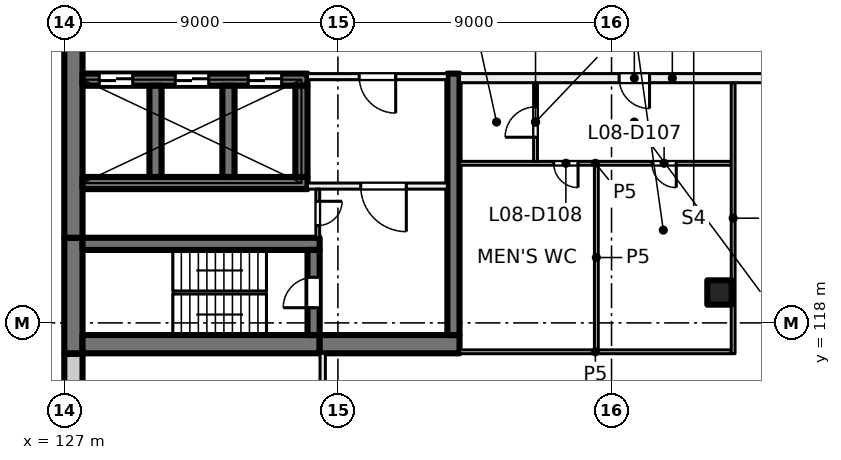
"""IFC4 building model, lengths in metres.
Left out: names, types, materials, properties, quantities, classifications, styles, units other than length and angle.
Written with IfcOpenShell. Run it as: python <this file> out.ifc"""

import sys

from ifc_helpers import new_model, si_unit, direction, frame, frame_2d, origin, origin_2d, place, context, subcontext, project, spatial, rectangle, extrude, element, fill, save


model = new_model("IFC4")
c1 = context("Model", 3, precision=1e-05, world=origin(), true_north=direction((0.0, 1.0)))
c2 = subcontext(c1, "Body", "Model", "MODEL_VIEW")
j1 = project(units=[si_unit("LENGTHUNIT", "METRE"), si_unit("PLANEANGLEUNIT", "RADIAN")], contexts=[c1])
p1 = place(None, origin())
s1 = spatial("IfcSite", under=j1, at=p1, CompositionType="ELEMENT")
p2 = place(p1, origin())
s2 = spatial("IfcBuilding", under=s1, at=p2, CompositionType="ELEMENT")
p3 = place(p2, frame((0.0, 0.0, 39.5)))
s3 = spatial("IfcBuildingStorey", under=s2, at=p3, CompositionType="ELEMENT", Elevation=39.5)
p4 = place(p3, frame((148.55, 119.0, 0.0), z_axis=(0.0, 0.0, 1.0), x_axis=(1.0, 0.0, 0.0)))
e1 = element("IfcColumn", 1, at=p4, inside=s3, PredefinedType="COLUMN", context=c2, shape_type="SweptSolid", body=[
    extrude(rectangle(XDim=0.8, YDim=0.8, at=origin_2d()), origin(), (0.0, 0.0, 1.0), 4.0),
])
p5 = place(p3, frame((127.3, 117.0, 0.0), z_axis=(0.0, 0.0, 1.0), x_axis=(0.0, 1.0, 0.0)))
e2 = element("IfcWall", 2, at=p5, inside=s3, PredefinedType="SHEAR", context=c2, shape_type="SweptSolid", body=[
    extrude(rectangle(XDim=3.8, YDim=0.6, at=frame_2d((1.9, 0.0))), origin(), (0.0, 0.0, 1.0), 4.0),
])
p6 = place(p3, frame((127.3, 120.8, 0.0), z_axis=(0.0, 0.0, 1.0), x_axis=(0.0, 1.0, 0.0)))
e3 = element("IfcWall", 3, at=p6, inside=s3, PredefinedType="SHEAR", context=c2, shape_type="SweptSolid", body=[
    extrude(rectangle(XDim=14.4, YDim=0.6, at=frame_2d((7.2, 0.0))), origin(), (0.0, 0.0, 1.0), 4.0),
])
p7 = place(p3, frame((127.6, 117.3, 0.0), z_axis=(0.0, 0.0, 1.0), x_axis=(1.0, 0.0, 0.0)))
e4 = element("IfcWall", 4, at=p7, inside=s3, PredefinedType="SHEAR", context=c2, shape_type="SweptSolid", body=[
    extrude(rectangle(XDim=7.8, YDim=0.6, at=frame_2d((3.9, 0.0))), origin(), (0.0, 0.0, 1.0), 4.0),
])
p8 = place(p3, frame((135.4, 117.3, 0.0), z_axis=(0.0, 0.0, 1.0), x_axis=(1.0, 0.0, 0.0)))
e5 = element("IfcWall", 5, at=p8, inside=s3, PredefinedType="SHEAR", context=c2, shape_type="SweptSolid", body=[
    extrude(rectangle(XDim=4.6, YDim=0.6, at=frame_2d((2.3, 0.0))), origin(), (0.0, 0.0, 1.0), 4.0),
])
p9 = place(p3, frame((127.6, 120.6, 0.0), z_axis=(0.0, 0.0, 1.0), x_axis=(1.0, 0.0, 0.0)))
e6 = element("IfcWall", 6, at=p9, inside=s3, PredefinedType="SHEAR", context=c2, shape_type="SweptSolid", body=[
    extrude(rectangle(XDim=7.8, YDim=0.4, at=frame_2d((3.9, 0.0))), origin(), (0.0, 0.0, 1.0), 4.0),
])
p10 = place(p3, frame((135.2, 117.6, 0.0), z_axis=(0.0, 0.0, 1.0), x_axis=(0.0, 1.0, 0.0)))
e7 = element("IfcWall", 7, at=p10, inside=s3, PredefinedType="SHEAR", context=c2, shape_type="SweptSolid", body=[
    extrude(rectangle(XDim=2.8, YDim=0.4, at=frame_2d((1.4, 0.0))), origin(), (0.0, 0.0, 1.0), 4.0),
])
p11 = place(p10, frame((0.9, 0.0, 0.0)))
e8 = element("IfcOpeningElement", 8, at=p11, cuts=e7, PredefinedType="OPENING", context=c2, shape_type="SweptSolid", body=[
    extrude(rectangle(XDim=1.0, YDim=2.1, at=frame_2d((0.5, 1.05))), frame((0.0, 0.21, 0.0), z_axis=(0.0, -1.0, 0.0), x_axis=(1.0, 0.0, 0.0)), (0.0, 0.0, 1.0), 0.42),
])
p12 = place(p3, frame((127.6, 126.0, 0.0), z_axis=(0.0, 0.0, 1.0), x_axis=(1.0, 0.0, 0.0)))
e9 = element("IfcWall", 9, at=p12, inside=s3, PredefinedType="SHEAR", context=c2, shape_type="SweptSolid", body=[
    extrude(rectangle(XDim=7.4, YDim=0.4, at=frame_2d((3.7, 0.0))), origin(), (0.0, 0.0, 1.0), 4.0),
])
p13 = place(p12, frame((0.55, 0.0, 0.0)))
e10 = element("IfcOpeningElement", 10, at=p13, cuts=e9, PredefinedType="OPENING", context=c2, shape_type="SweptSolid", body=[
    extrude(rectangle(XDim=1.1, YDim=2.1, at=frame_2d((0.55, 1.05))), frame((0.0, 0.21, 0.0), z_axis=(0.0, -1.0, 0.0), x_axis=(1.0, 0.0, 0.0)), (0.0, 0.0, 1.0), 0.42),
])
p14 = place(p12, frame((3.05, 0.0, 0.0)))
e11 = element("IfcOpeningElement", 11, at=p14, cuts=e9, PredefinedType="OPENING", context=c2, shape_type="SweptSolid", body=[
    extrude(rectangle(XDim=1.1, YDim=2.1, at=frame_2d((0.55, 1.05))), frame((0.0, 0.21, 0.0), z_axis=(0.0, -1.0, 0.0), x_axis=(1.0, 0.0, 0.0)), (0.0, 0.0, 1.0), 0.42),
])
p15 = place(p12, frame((5.45, 0.0, 0.0)))
e12 = element("IfcOpeningElement", 12, at=p15, cuts=e9, PredefinedType="OPENING", context=c2, shape_type="SweptSolid", body=[
    extrude(rectangle(XDim=1.1, YDim=2.1, at=frame_2d((0.55, 1.05))), frame((0.0, 0.21, 0.0), z_axis=(0.0, -1.0, 0.0), x_axis=(1.0, 0.0, 0.0)), (0.0, 0.0, 1.0), 0.42),
])
p16 = place(p3, frame((127.6, 122.6, 0.0), z_axis=(0.0, 0.0, 1.0), x_axis=(1.0, 0.0, 0.0)))
e13 = element("IfcWall", 13, at=p16, inside=s3, PredefinedType="SHEAR", context=c2, shape_type="SweptSolid", body=[
    extrude(rectangle(XDim=7.4, YDim=0.4, at=frame_2d((3.7, 0.0))), origin(), (0.0, 0.0, 1.0), 4.0),
])
for number, where, z_axis, x_axis in (
    (14, (130.0, 122.8, 0.0), (0.0, 0.0, 1.0), (0.0, 1.0, 0.0)),
    (15, (132.4, 122.8, 0.0), (0.0, 0.0, 1.0), (0.0, 1.0, 0.0)),
    (16, (134.8, 122.8, 0.0), (0.0, 0.0, 1.0), (0.0, 1.0, 0.0)),
):
    element("IfcWall", number, at=place(p3, frame(where, z_axis=z_axis, x_axis=x_axis)), inside=s3, PredefinedType="SHEAR", context=c2, shape_type="SweptSolid", body=[
        extrude(rectangle(XDim=3.0, YDim=0.4, at=frame_2d((1.5, 0.0))), origin(), (0.0, 0.0, 1.0), 4.0),
    ])
p17 = place(p3, frame((139.8, 117.6, 0.0), z_axis=(0.0, 0.0, 1.0), x_axis=(0.0, 1.0, 0.0)))
e17 = element("IfcWall", 17, at=p17, inside=s3, PredefinedType="SHEAR", context=c2, shape_type="SweptSolid", body=[
    extrude(rectangle(XDim=8.6, YDim=0.4, at=frame_2d((4.3, 0.0))), origin(), (0.0, 0.0, 1.0), 4.0),
])
p18 = place(p3, frame((127.3, 114.07, 0.0), z_axis=(0.0, 0.0, 1.0), x_axis=(0.0, 1.0, 0.0)))
e18 = element("IfcWall", 18, at=p18, inside=s3, PredefinedType="SOLIDWALL", context=c2, shape_type="SweptSolid", body=[
    extrude(rectangle(XDim=2.91, YDim=0.6, at=frame_2d((1.455, 0.0))), origin(), (0.0, 0.0, 1.0), 3.625),
])
p19 = place(p3, frame((139.6, 126.1, 0.0), z_axis=(0.0, 0.0, 1.0), x_axis=(-1.0, 0.0, 0.0)))
e19 = element("IfcWall", 19, at=p19, inside=s3, PredefinedType="PARTITIONING", context=c2, shape_type="SweptSolid", body=[
    extrude(rectangle(XDim=4.6, YDim=0.2, at=frame_2d((2.3, 0.0))), origin(), (0.0, 0.0, 1.0), 3.625),
])
p20 = place(p19, frame((1.7, 0.0, 0.0)))
e20 = element("IfcOpeningElement", 20, at=p20, cuts=e19, PredefinedType="OPENING", context=c2, shape_type="SweptSolid", body=[
    extrude(rectangle(XDim=1.2, YDim=2.1, at=frame_2d((0.6, 1.05))), frame((0.0, 0.11, 0.0), z_axis=(0.0, -1.0, 0.0), x_axis=(1.0, 0.0, 0.0)), (0.0, 0.0, 1.0), 0.22),
])
p21 = place(p3, frame((139.6, 122.5, 0.0), z_axis=(0.0, 0.0, 1.0), x_axis=(-1.0, 0.0, 0.0)))
e21 = element("IfcWall", 21, at=p21, inside=s3, PredefinedType="PARTITIONING", context=c2, shape_type="SweptSolid", body=[
    extrude(rectangle(XDim=4.6, YDim=0.2, at=frame_2d((2.3, 0.0))), origin(), (0.0, 0.0, 1.0), 3.625),
])
p22 = place(p21, frame((1.35, 0.0, 0.0)))
e22 = element("IfcOpeningElement", 22, at=p22, cuts=e21, PredefinedType="OPENING", context=c2, shape_type="SweptSolid", body=[
    extrude(rectangle(XDim=1.5, YDim=2.1, at=frame_2d((0.75, 1.05))), frame((0.0, 0.11, 0.0), z_axis=(0.0, -1.0, 0.0), x_axis=(1.0, 0.0, 0.0)), (0.0, 0.0, 1.0), 0.22),
])
p23 = place(p3, frame((135.337, 122.4, 0.0), z_axis=(0.0, 0.0, 1.0), x_axis=(0.0, -1.0, 0.0)))
e23 = element("IfcWall", 23, at=p23, inside=s3, PredefinedType="PARTITIONING", context=c2, shape_type="SweptSolid", body=[
    extrude(rectangle(XDim=1.6, YDim=0.125, at=frame_2d((0.8, 0.0))), origin(), (0.0, 0.0, 1.0), 3.625),
])
p24 = place(p23, frame((0.4, 0.0, 0.0)))
e24 = element("IfcOpeningElement", 24, at=p24, cuts=e23, PredefinedType="OPENING", context=c2, shape_type="SweptSolid", body=[
    extrude(rectangle(XDim=0.8, YDim=2.1, at=frame_2d((0.4, 1.05))), frame((0.0, 0.073, 0.0), z_axis=(0.0, -1.0, 0.0), x_axis=(1.0, 0.0, 0.0)), (0.0, 0.0, 1.0), 0.145),
])
p25 = place(p3, frame((135.5, 117.0, 0.0), z_axis=(0.0, 0.0, 1.0), x_axis=(0.0, -1.0, 0.0)))
e25 = element("IfcWall", 25, at=p25, inside=s3, PredefinedType="PARTITIONING", context=c2, shape_type="SweptSolid", body=[
    extrude(rectangle(XDim=6.4, YDim=0.175, at=frame_2d((3.2, 0.0))), origin(), (0.0, 0.0, 1.0), 3.625),
])
p26 = place(p25, frame((2.6, 0.0, 0.0)))
e26 = element("IfcOpeningElement", 26, at=p26, cuts=e25, PredefinedType="OPENING", context=c2, shape_type="SweptSolid", body=[
    extrude(rectangle(XDim=1.2, YDim=2.1, at=frame_2d((0.6, 1.05))), frame((0.0, 0.097, 0.0), z_axis=(0.0, -1.0, 0.0), x_axis=(1.0, 0.0, 0.0)), (0.0, 0.0, 1.0), 0.195),
])
p27 = place(p3, frame((140.0, 117.05, 0.0), z_axis=(0.0, 0.0, 1.0), x_axis=(1.0, 0.0, 0.0)))
e27 = element("IfcWall", 27, at=p27, inside=s3, PredefinedType="PARTITIONING", context=c2, shape_type="SweptSolid", body=[
    extrude(rectangle(XDim=8.938, YDim=0.125, at=frame_2d((4.469, 0.0))), origin(), (0.0, 0.0, 1.0), 3.625),
])
p28 = place(p3, frame((148.938, 123.25, 0.0), z_axis=(0.0, 0.0, 1.0), x_axis=(-1.0, 0.0, 0.0)))
e28 = element("IfcWall", 28, at=p28, inside=s3, PredefinedType="PARTITIONING", context=c2, shape_type="SweptSolid", body=[
    extrude(rectangle(XDim=8.938, YDim=0.125, at=frame_2d((4.469, 0.0))), origin(), (0.0, 0.0, 1.0), 3.625),
])
p29 = place(p28, frame((1.809, 0.0, 0.0)))
e29 = element("IfcOpeningElement", 29, at=p29, cuts=e28, PredefinedType="OPENING", context=c2, shape_type="SweptSolid", body=[
    extrude(rectangle(XDim=0.8, YDim=2.1, at=frame_2d((0.4, 1.05))), frame((0.0, 0.073, 0.0), z_axis=(0.0, -1.0, 0.0), x_axis=(1.0, 0.0, 0.0)), (0.0, 0.0, 1.0), 0.145),
])
p30 = place(p28, frame((5.04, 0.0, 0.0)))
e30 = element("IfcOpeningElement", 30, at=p30, cuts=e28, PredefinedType="OPENING", context=c2, shape_type="SweptSolid", body=[
    extrude(rectangle(XDim=0.8, YDim=2.1, at=frame_2d((0.4, 1.05))), frame((0.0, 0.073, 0.0), z_axis=(0.0, -1.0, 0.0), x_axis=(1.0, 0.0, 0.0)), (0.0, 0.0, 1.0), 0.145),
])
p31 = place(p3, frame((142.5, 123.312, 0.0), z_axis=(0.0, 0.0, 1.0), x_axis=(0.0, 1.0, 0.0)))
e31 = element("IfcWall", 31, at=p31, inside=s3, PredefinedType="PARTITIONING", context=c2, shape_type="SweptSolid", body=[
    extrude(rectangle(XDim=2.588, YDim=0.125, at=frame_2d((1.294, 0.0))), origin(), (0.0, 0.0, 1.0), 3.625),
])
p32 = place(p31, frame((0.794, 0.0, 0.0)))
e32 = element("IfcOpeningElement", 32, at=p32, cuts=e31, PredefinedType="OPENING", context=c2, shape_type="SweptSolid", body=[
    extrude(rectangle(XDim=1.0, YDim=2.1, at=frame_2d((0.5, 1.05))), frame((0.0, 0.073, 0.0), z_axis=(0.0, -1.0, 0.0), x_axis=(1.0, 0.0, 0.0)), (0.0, 0.0, 1.0), 0.145),
])
p33 = place(p3, frame((144.5, 123.188, 0.0), z_axis=(0.0, 0.0, 1.0), x_axis=(0.0, -1.0, 0.0)))
e33 = element("IfcWall", 33, at=p33, inside=s3, PredefinedType="PARTITIONING", context=c2, shape_type="SweptSolid", body=[
    extrude(rectangle(XDim=6.076, YDim=0.125, at=frame_2d((3.038, 0.0))), origin(), (0.0, 0.0, 1.0), 3.625),
])
p34 = place(p3, frame((149.0, 116.988, 0.0), z_axis=(0.0, 0.0, 1.0), x_axis=(0.0, 1.0, 0.0)))
e34 = element("IfcWall", 34, at=p34, inside=s3, PredefinedType="PARTITIONING", context=c2, shape_type="SweptSolid", body=[
    extrude(rectangle(XDim=8.912, YDim=0.125, at=frame_2d((4.456, 0.0))), origin(), (0.0, 0.0, 1.0), 3.625),
])
p35 = place(p3, frame((154.0, 126.05, 0.0), z_axis=(0.0, 0.0, 1.0), x_axis=(-1.0, 0.0, 0.0)))
e35 = element("IfcWall", 35, at=p35, inside=s3, PredefinedType="PARTITIONING", context=c2, shape_type="SweptSolid", body=[
    extrude(rectangle(XDim=14.0, YDim=0.3, at=frame_2d((7.0, 0.0))), origin(), (0.0, 0.0, 1.0), 3.625),
])
p36 = place(p35, frame((7.75, 0.0, 0.0)))
e36 = element("IfcOpeningElement", 36, at=p36, cuts=e35, PredefinedType="OPENING", context=c2, shape_type="SweptSolid", body=[
    extrude(rectangle(XDim=1.0, YDim=2.1, at=frame_2d((0.5, 1.05))), frame((0.0, 0.16, 0.0), z_axis=(0.0, -1.0, 0.0), x_axis=(1.0, 0.0, 0.0)), (0.0, 0.0, 1.0), 0.32),
])
p37 = place(p35, frame((1.6, 0.0, 0.0)))
e37 = element("IfcOpeningElement", 37, at=p37, cuts=e35, PredefinedType="OPENING", context=c2, shape_type="SweptSolid", body=[
    extrude(rectangle(XDim=1.8, YDim=2.1, at=frame_2d((0.9, 1.05))), frame((0.0, 0.16, 0.0), z_axis=(0.0, -1.0, 0.0), x_axis=(1.0, 0.0, 0.0)), (0.0, 0.0, 1.0), 0.32),
])
p38 = place(p13, origin())
e38 = element("IfcDoor", 38, at=p38, inside=s3, OperationType="DOUBLE_DOOR_SLIDING", PredefinedType="DOOR", context=c2, shape_type="SweptSolid", body=[
    extrude(rectangle(XDim=1.1, YDim=2.1, at=frame_2d((0.55, 1.05))), frame((0.0, 0.025, 0.0), z_axis=(0.0, -1.0, 0.0), x_axis=(1.0, 0.0, 0.0)), (0.0, 0.0, 1.0), 0.05),
])
fill(e10, e38)
p39 = place(p14, origin())
e39 = element("IfcDoor", 39, at=p39, inside=s3, OperationType="DOUBLE_DOOR_SLIDING", PredefinedType="DOOR", context=c2, shape_type="SweptSolid", body=[
    extrude(rectangle(XDim=1.1, YDim=2.1, at=frame_2d((0.55, 1.05))), frame((0.0, 0.025, 0.0), z_axis=(0.0, -1.0, 0.0), x_axis=(1.0, 0.0, 0.0)), (0.0, 0.0, 1.0), 0.05),
])
fill(e11, e39)
p40 = place(p15, origin())
e40 = element("IfcDoor", 40, at=p40, inside=s3, OperationType="DOUBLE_DOOR_SLIDING", PredefinedType="DOOR", context=c2, shape_type="SweptSolid", body=[
    extrude(rectangle(XDim=1.1, YDim=2.1, at=frame_2d((0.55, 1.05))), frame((0.0, 0.025, 0.0), z_axis=(0.0, -1.0, 0.0), x_axis=(1.0, 0.0, 0.0)), (0.0, 0.0, 1.0), 0.05),
])
fill(e12, e40)
p41 = place(p20, origin())
e41 = element("IfcDoor", 41, at=p41, inside=s3, OperationType="DOUBLE_DOOR_SINGLE_SWING", PredefinedType="DOOR", context=c2, shape_type="SweptSolid", body=[
    extrude(rectangle(XDim=1.2, YDim=2.1, at=frame_2d((0.6, 1.05))), frame((0.0, 0.025, 0.0), z_axis=(0.0, -1.0, 0.0), x_axis=(1.0, 0.0, 0.0)), (0.0, 0.0, 1.0), 0.05),
])
fill(e20, e41)
p42 = place(p22, origin())
e42 = element("IfcDoor", 42, at=p42, inside=s3, OperationType="DOUBLE_DOOR_SINGLE_SWING", PredefinedType="DOOR", context=c2, shape_type="SweptSolid", body=[
    extrude(rectangle(XDim=1.5, YDim=2.1, at=frame_2d((0.75, 1.05))), frame((0.0, 0.025, 0.0), z_axis=(0.0, -1.0, 0.0), x_axis=(1.0, 0.0, 0.0)), (0.0, 0.0, 1.0), 0.05),
])
fill(e22, e42)
p43 = place(p11, origin())
e43 = element("IfcDoor", 43, at=p43, inside=s3, OperationType="SINGLE_SWING_RIGHT", PredefinedType="DOOR", context=c2, shape_type="SweptSolid", body=[
    extrude(rectangle(XDim=1.0, YDim=2.1, at=frame_2d((0.5, 1.05))), frame((0.0, 0.025, 0.0), z_axis=(0.0, -1.0, 0.0), x_axis=(1.0, 0.0, 0.0)), (0.0, 0.0, 1.0), 0.05),
])
fill(e8, e43)
p44 = place(p24, origin())
e44 = element("IfcDoor", 44, at=p44, inside=s3, OperationType="SINGLE_SWING_LEFT", PredefinedType="DOOR", context=c2, shape_type="SweptSolid", body=[
    extrude(rectangle(XDim=0.8, YDim=2.1, at=frame_2d((0.4, 1.05))), frame((0.0, 0.025, 0.0), z_axis=(0.0, -1.0, 0.0), x_axis=(1.0, 0.0, 0.0)), (0.0, 0.0, 1.0), 0.05),
])
fill(e24, e44)
p45 = place(p36, origin())
e45 = element("IfcDoor", 45, at=p45, inside=s3, OperationType="SINGLE_SWING_RIGHT", PredefinedType="DOOR", context=c2, shape_type="SweptSolid", body=[
    extrude(rectangle(XDim=1.0, YDim=2.1, at=frame_2d((0.5, 1.05))), frame((0.0, 0.025, 0.0), z_axis=(0.0, -1.0, 0.0), x_axis=(1.0, 0.0, 0.0)), (0.0, 0.0, 1.0), 0.05),
])
fill(e36, e45)
p46 = place(p32, origin())
e46 = element("IfcDoor", 46, at=p46, inside=s3, OperationType="SINGLE_SWING_RIGHT", PredefinedType="DOOR", context=c2, shape_type="SweptSolid", body=[
    extrude(rectangle(XDim=1.0, YDim=2.1, at=frame_2d((0.5, 1.05))), frame((0.0, 0.025, 0.0), z_axis=(0.0, -1.0, 0.0), x_axis=(1.0, 0.0, 0.0)), (0.0, 0.0, 1.0), 0.05),
])
fill(e32, e46)
p47 = place(p29, origin())
e47 = element("IfcDoor", 47, at=p47, inside=s3, OperationType="SINGLE_SWING_LEFT", PredefinedType="DOOR", context=c2, shape_type="SweptSolid", body=[
    extrude(rectangle(XDim=0.8, YDim=2.1, at=frame_2d((0.4, 1.05))), frame((0.0, 0.025, 0.0), z_axis=(0.0, -1.0, 0.0), x_axis=(1.0, 0.0, 0.0)), (0.0, 0.0, 1.0), 0.05),
])
fill(e29, e47)
p48 = place(p30, origin())
e48 = element("IfcDoor", 48, at=p48, inside=s3, OperationType="SINGLE_SWING_LEFT", PredefinedType="DOOR", context=c2, shape_type="SweptSolid", body=[
    extrude(rectangle(XDim=0.8, YDim=2.1, at=frame_2d((0.4, 1.05))), frame((0.0, 0.025, 0.0), z_axis=(0.0, -1.0, 0.0), x_axis=(1.0, 0.0, 0.0)), (0.0, 0.0, 1.0), 0.05),
])
fill(e30, e48)
save(model, sys.argv[1])
